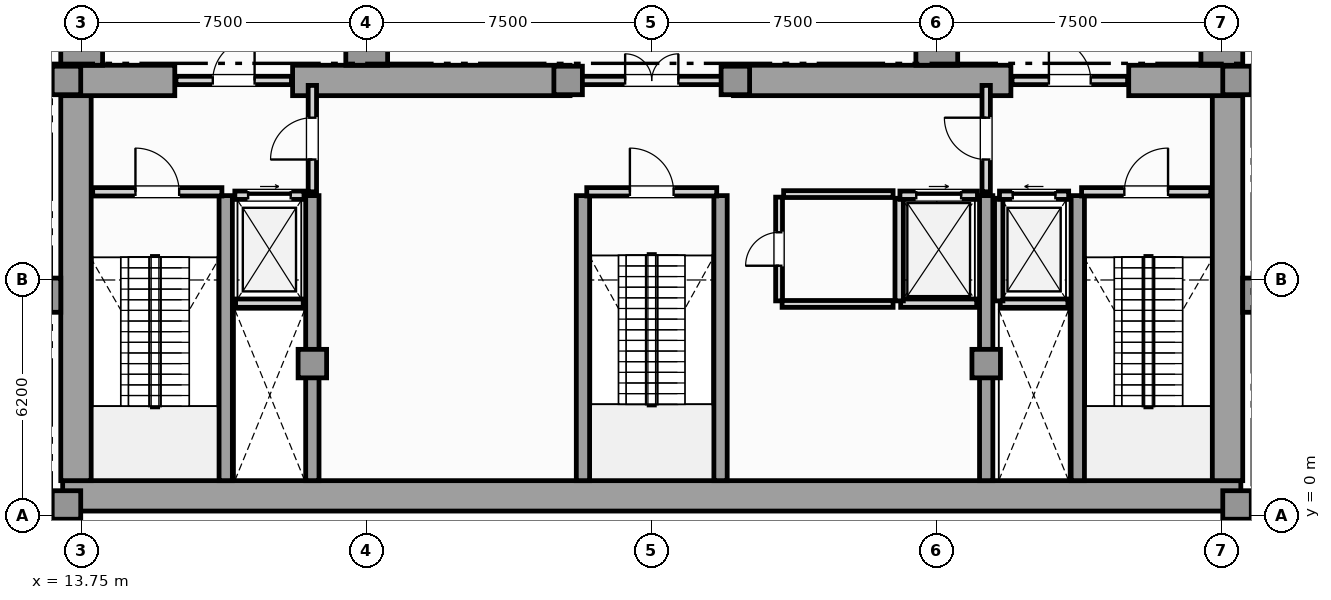
"""IFC4 building model, lengths in metres.
Left out: names, types, materials, properties, quantities, classifications, styles, units other than length and angle.
Written with IfcOpenShell. Run it as: python <this file> out.ifc"""

import sys

from ifc_helpers import new_model, si_unit, direction, frame, frame_2d, origin, origin_2d, place, context, subcontext, project, spatial, rectangle, extrude, element, fill, save


model = new_model("IFC4")
c1 = context("Model", 3, precision=1e-05, world=origin(), true_north=direction((0.0, 1.0)))
c2 = subcontext(c1, "Body", "Model", "MODEL_VIEW")
j1 = project(units=[si_unit("LENGTHUNIT", "METRE"), si_unit("PLANEANGLEUNIT", "RADIAN")], contexts=[c1])
p1 = place(None, origin())
s1 = spatial("IfcSite", under=j1, at=p1, CompositionType="ELEMENT")
p2 = place(p1, origin())
s2 = spatial("IfcBuilding", under=s1, at=p2, CompositionType="ELEMENT")
p3 = place(p2, frame((0.0, 0.0, -5.4)))
s3 = spatial("IfcBuildingStorey", under=s2, at=p3, CompositionType="ELEMENT", Elevation=-5.4)
p4 = place(p3, frame((13.25, 0.52, 0.0), z_axis=(0.0, 0.0, 1.0), x_axis=(1.0, 0.0, 0.0)))
e1 = element("IfcWall", 1, at=p4, inside=s3, PredefinedType="SHEAR", context=c2, shape_type="SweptSolid", body=[
    extrude(rectangle(XDim=31.0, YDim=0.8, at=frame_2d((15.5, 0.0))), origin(), (0.0, 0.0, 1.0), 5.05),
])
for number, where, z_axis, x_axis in (
    (2, (13.6, 0.92, 0.0), (0.0, 0.0, 1.0), (0.0, 1.0, 0.0)),
    (3, (43.9, 0.92, 0.0), (0.0, 0.0, 1.0), (0.0, 1.0, 0.0)),
):
    element("IfcWall", number, at=place(p3, frame(where, z_axis=z_axis, x_axis=x_axis)), inside=s3, PredefinedType="SHEAR", context=c2, shape_type="SweptSolid", body=[
        extrude(rectangle(XDim=10.53, YDim=0.8, at=frame_2d((5.265, 0.0))), origin(), (0.0, 0.0, 1.0), 5.05),
    ])
p5 = place(p3, frame((13.25, 11.45, 0.0), z_axis=(0.0, 0.0, 1.0), x_axis=(1.0, 0.0, 0.0)))
e4 = element("IfcWall", 4, at=p5, inside=s3, PredefinedType="SHEAR", context=c2, shape_type="SweptSolid", body=[
    extrude(rectangle(XDim=2.95, YDim=0.8, at=frame_2d((1.475, 0.0))), origin(), (0.0, 0.0, 1.0), 5.05),
])
for number, where, z_axis, x_axis in (
    (5, (19.3, 11.45, 0.0), (0.0, 0.0, 1.0), (1.0, 0.0, 0.0)),
    (6, (30.9, 11.45, 0.0), (0.0, 0.0, 1.0), (1.0, 0.0, 0.0)),
):
    element("IfcWall", number, at=place(p3, frame(where, z_axis=z_axis, x_axis=x_axis)), inside=s3, PredefinedType="SHEAR", context=c2, shape_type="SweptSolid", body=[
        extrude(rectangle(XDim=7.3, YDim=0.8, at=frame_2d((3.65, 0.0))), origin(), (0.0, 0.0, 1.0), 5.05),
    ])
p6 = place(p3, frame((41.3, 11.45, 0.0), z_axis=(0.0, 0.0, 1.0), x_axis=(1.0, 0.0, 0.0)))
e7 = element("IfcWall", 7, at=p6, inside=s3, PredefinedType="SHEAR", context=c2, shape_type="SweptSolid", body=[
    extrude(rectangle(XDim=2.95, YDim=0.8, at=frame_2d((1.475, 0.0))), origin(), (0.0, 0.0, 1.0), 5.05),
])
for number, where, z_axis, x_axis in (
    (8, (17.54, 0.92, 0.0), (0.0, 0.0, 1.0), (0.0, 1.0, 0.0)),
    (9, (19.82, 0.92, 0.0), (0.0, 0.0, 1.0), (0.0, 1.0, 0.0)),
    (10, (26.94, 0.92, 0.0), (0.0, 0.0, 1.0), (0.0, 1.0, 0.0)),
    (11, (30.56, 0.92, 0.0), (0.0, 0.0, 1.0), (0.0, 1.0, 0.0)),
    (12, (37.55, 0.92, 0.0), (0.0, 0.0, 1.0), (0.0, 1.0, 0.0)),
    (13, (39.96, 0.92, 0.0), (0.0, 0.0, 1.0), (0.0, 1.0, 0.0)),
):
    element("IfcWall", number, at=place(p3, frame(where, z_axis=z_axis, x_axis=x_axis)), inside=s3, PredefinedType="SHEAR", context=c2, shape_type="SweptSolid", body=[
        extrude(rectangle(XDim=7.5, YDim=0.35, at=frame_2d((3.75, 0.0))), origin(), (0.0, 0.0, 1.0), 5.05),
    ])
for number, where, z_axis, x_axis in (
    (14, (12.9, 5.8, 0.0), (0.0, 0.0, 1.0), (1.0, 0.0, 0.0)),
    (15, (44.6, 5.8, 0.0), (0.0, 0.0, 1.0), (1.0, 0.0, 0.0)),
):
    element("IfcColumn", number, at=place(p3, frame(where, z_axis=z_axis, x_axis=x_axis)), inside=s3, PredefinedType="PILASTER", context=c2, shape_type="SweptSolid", body=[
        extrude(rectangle(XDim=0.6, YDim=0.9, at=origin_2d()), origin(), (0.0, 0.0, 1.0), 5.4),
    ])
for number, where, z_axis, x_axis in (
    (16, (13.35, 0.28, 0.0), (0.0, 0.0, 1.0), (1.0, 0.0, 0.0)),
    (17, (44.15, 0.28, 0.0), (0.0, 0.0, 1.0), (1.0, 0.0, 0.0)),
    (18, (13.35, 11.45, 0.0), (0.0, 0.0, 1.0), (1.0, 0.0, 0.0)),
    (19, (44.15, 11.45, 0.0), (0.0, 0.0, 1.0), (1.0, 0.0, 0.0)),
    (20, (19.82, 4.0, 0.0), (0.0, 0.0, 1.0), (1.0, 0.0, 0.0)),
    (21, (37.55, 4.0, 0.0), (0.0, 0.0, 1.0), (1.0, 0.0, 0.0)),
    (22, (26.55, 11.45, 0.0), (0.0, 0.0, 1.0), (1.0, 0.0, 0.0)),
    (23, (30.95, 11.45, 0.0), (0.0, 0.0, 1.0), (1.0, 0.0, 0.0)),
):
    element("IfcColumn", number, at=place(p3, frame(where, z_axis=z_axis, x_axis=x_axis)), inside=s3, PredefinedType="COLUMN", context=c2, shape_type="SweptSolid", body=[
        extrude(rectangle(XDim=0.75, YDim=0.75, at=origin_2d()), origin(), (0.0, 0.0, 1.0), 5.4),
    ])
for number, where, z_axis, x_axis in (
    (24, (13.75, 12.4, 0.0), (0.0, 0.0, 1.0), (1.0, 0.0, 0.0)),
    (25, (43.75, 12.4, 0.0), (0.0, 0.0, 1.0), (1.0, 0.0, 0.0)),
    (26, (21.25, 12.4, 0.0), (0.0, 0.0, 1.0), (1.0, 0.0, 0.0)),
    (27, (36.25, 12.4, 0.0), (0.0, 0.0, 1.0), (1.0, 0.0, 0.0)),
):
    element("IfcColumn", number, at=place(p3, frame(where, z_axis=z_axis, x_axis=x_axis)), inside=s3, PredefinedType="COLUMN", context=c2, shape_type="SweptSolid", body=[
        extrude(rectangle(XDim=1.1, YDim=1.1, at=origin_2d()), origin(), (0.0, 0.0, 1.0), 5.4),
    ])
p7 = place(p3, frame((17.8, 5.59, 0.0), z_axis=(0.0, 0.0, 1.0), x_axis=(1.0, 0.0, 0.0)))
e28 = element("IfcWall", 28, at=p7, inside=s3, PredefinedType="SOLIDWALL", context=c2, shape_type="SweptSolid", body=[
    extrude(rectangle(XDim=1.78, YDim=0.22, at=frame_2d((0.89, 0.0))), origin(), (0.0, 0.0, 1.0), 5.05),
])
p8 = place(p3, frame((17.78, 8.43, 0.0), z_axis=(0.0, 0.0, 1.0), x_axis=(1.0, 0.0, 0.0)))
e29 = element("IfcWall", 29, at=p8, inside=s3, PredefinedType="SOLIDWALL", context=c2, shape_type="SweptSolid", body=[
    extrude(rectangle(XDim=1.82, YDim=0.22, at=frame_2d((0.91, 0.0))), origin(), (0.0, 0.0, 1.0), 5.05),
])
p9 = place(p8, frame((0.35, 0.0, 0.0)))
e30 = element("IfcOpeningElement", 30, at=p9, cuts=e29, PredefinedType="OPENING", context=c2, shape_type="SweptSolid", body=[
    extrude(rectangle(XDim=1.12, YDim=2.25, at=frame_2d((0.56, 1.125))), frame((0.0, 0.12, 0.0), z_axis=(0.0, -1.0, 0.0), x_axis=(1.0, 0.0, 0.0)), (0.0, 0.0, 1.0), 0.24),
])
p10 = place(p3, frame((37.92, 5.59, 0.0), z_axis=(0.0, 0.0, 1.0), x_axis=(1.0, 0.0, 0.0)))
e31 = element("IfcWall", 31, at=p10, inside=s3, PredefinedType="SOLIDWALL", context=c2, shape_type="SweptSolid", body=[
    extrude(rectangle(XDim=1.78, YDim=0.22, at=frame_2d((0.89, 0.0))), origin(), (0.0, 0.0, 1.0), 5.05),
])
p11 = place(p3, frame((37.88, 5.65, 0.0), z_axis=(0.0, 0.0, 1.0), x_axis=(0.0, 1.0, 0.0)))
e32 = element("IfcWall", 32, at=p11, inside=s3, PredefinedType="SOLIDWALL", context=c2, shape_type="SweptSolid", body=[
    extrude(rectangle(XDim=2.7, YDim=0.22, at=frame_2d((1.35, 0.0))), origin(), (0.0, 0.0, 1.0), 5.05),
])
p12 = place(p3, frame((37.9, 8.43, 0.0), z_axis=(0.0, 0.0, 1.0), x_axis=(1.0, 0.0, 0.0)))
e33 = element("IfcWall", 33, at=p12, inside=s3, PredefinedType="SOLIDWALL", context=c2, shape_type="SweptSolid", body=[
    extrude(rectangle(XDim=1.82, YDim=0.22, at=frame_2d((0.91, 0.0))), origin(), (0.0, 0.0, 1.0), 5.05),
])
p13 = place(p12, frame((0.35, 0.0, 0.0)))
e34 = element("IfcOpeningElement", 34, at=p13, cuts=e33, PredefinedType="OPENING", context=c2, shape_type="SweptSolid", body=[
    extrude(rectangle(XDim=1.12, YDim=2.25, at=frame_2d((0.56, 1.125))), frame((0.0, 0.12, 0.0), z_axis=(0.0, -1.0, 0.0), x_axis=(1.0, 0.0, 0.0)), (0.0, 0.0, 1.0), 0.24),
])
p14 = place(p3, frame((35.3, 5.59, 0.0), z_axis=(0.0, 0.0, 1.0), x_axis=(1.0, 0.0, 0.0)))
e35 = element("IfcWall", 35, at=p14, inside=s3, PredefinedType="SOLIDWALL", context=c2, shape_type="SweptSolid", body=[
    extrude(rectangle(XDim=2.0, YDim=0.22, at=frame_2d((1.0, 0.0))), origin(), (0.0, 0.0, 1.0), 5.05),
])
p15 = place(p3, frame((35.26, 5.65, 0.0), z_axis=(0.0, 0.0, 1.0), x_axis=(0.0, 1.0, 0.0)))
e36 = element("IfcWall", 36, at=p15, inside=s3, PredefinedType="SOLIDWALL", context=c2, shape_type="SweptSolid", body=[
    extrude(rectangle(XDim=2.7, YDim=0.22, at=frame_2d((1.35, 0.0))), origin(), (0.0, 0.0, 1.0), 5.05),
])
p16 = place(p3, frame((35.28, 8.43, 0.0), z_axis=(0.0, 0.0, 1.0), x_axis=(1.0, 0.0, 0.0)))
e37 = element("IfcWall", 37, at=p16, inside=s3, PredefinedType="SOLIDWALL", context=c2, shape_type="SweptSolid", body=[
    extrude(rectangle(XDim=2.04, YDim=0.22, at=frame_2d((1.02, 0.0))), origin(), (0.0, 0.0, 1.0), 5.05),
])
p17 = place(p16, frame((0.43, 0.0, 0.0)))
e38 = element("IfcOpeningElement", 38, at=p17, cuts=e37, PredefinedType="OPENING", context=c2, shape_type="SweptSolid", body=[
    extrude(rectangle(XDim=1.18, YDim=2.2, at=frame_2d((0.59, 1.1))), frame((0.0, 0.12, 0.0), z_axis=(0.0, -1.0, 0.0), x_axis=(1.0, 0.0, 0.0)), (0.0, 0.0, 1.0), 0.24),
])
p18 = place(p3, frame((14.04, 8.52, 0.0), z_axis=(0.0, 0.0, 1.0), x_axis=(1.0, 0.0, 0.0)))
e39 = element("IfcWall", 39, at=p18, inside=s3, PredefinedType="SOLIDWALL", context=c2, shape_type="SweptSolid", body=[
    extrude(rectangle(XDim=3.4, YDim=0.22, at=frame_2d((1.7, 0.0))), origin(), (0.0, 0.0, 1.0), 5.05),
])
p19 = place(p18, frame((1.125, 0.0, 0.0)))
e40 = element("IfcOpeningElement", 40, at=p19, cuts=e39, PredefinedType="OPENING", context=c2, shape_type="SweptSolid", body=[
    extrude(rectangle(XDim=1.15, YDim=2.2, at=frame_2d((0.575, 1.1))), frame((0.0, 0.12, 0.0), z_axis=(0.0, -1.0, 0.0), x_axis=(1.0, 0.0, 0.0)), (0.0, 0.0, 1.0), 0.24),
])
p20 = place(p3, frame((40.06, 8.52, 0.0), z_axis=(0.0, 0.0, 1.0), x_axis=(1.0, 0.0, 0.0)))
e41 = element("IfcWall", 41, at=p20, inside=s3, PredefinedType="SOLIDWALL", context=c2, shape_type="SweptSolid", body=[
    extrude(rectangle(XDim=3.4, YDim=0.22, at=frame_2d((1.7, 0.0))), origin(), (0.0, 0.0, 1.0), 5.05),
])
p21 = place(p20, frame((1.125, 0.0, 0.0)))
e42 = element("IfcOpeningElement", 42, at=p21, cuts=e41, PredefinedType="OPENING", context=c2, shape_type="SweptSolid", body=[
    extrude(rectangle(XDim=1.15, YDim=2.2, at=frame_2d((0.575, 1.1))), frame((0.0, 0.12, 0.0), z_axis=(0.0, -1.0, 0.0), x_axis=(1.0, 0.0, 0.0)), (0.0, 0.0, 1.0), 0.24),
])
p22 = place(p3, frame((27.04, 8.52, 0.0), z_axis=(0.0, 0.0, 1.0), x_axis=(1.0, 0.0, 0.0)))
e43 = element("IfcWall", 43, at=p22, inside=s3, PredefinedType="SOLIDWALL", context=c2, shape_type="SweptSolid", body=[
    extrude(rectangle(XDim=3.42, YDim=0.22, at=frame_2d((1.71, 0.0))), origin(), (0.0, 0.0, 1.0), 5.05),
])
p23 = place(p22, frame((1.135, 0.0, 0.0)))
e44 = element("IfcOpeningElement", 44, at=p23, cuts=e43, PredefinedType="OPENING", context=c2, shape_type="SweptSolid", body=[
    extrude(rectangle(XDim=1.15, YDim=2.2, at=frame_2d((0.575, 1.1))), frame((0.0, 0.12, 0.0), z_axis=(0.0, -1.0, 0.0), x_axis=(1.0, 0.0, 0.0)), (0.0, 0.0, 1.0), 0.24),
])
p24 = place(p3, frame((19.82, 8.52, 0.0), z_axis=(0.0, 0.0, 1.0), x_axis=(0.0, 1.0, 0.0)))
e45 = element("IfcWall", 45, at=p24, inside=s3, PredefinedType="SOLIDWALL", context=c2, shape_type="SweptSolid", body=[
    extrude(rectangle(XDim=2.8, YDim=0.22, at=frame_2d((1.4, 0.0))), origin(), (0.0, 0.0, 1.0), 4.505),
])
p25 = place(p24, frame((0.85, 0.0, 0.0)))
e46 = element("IfcOpeningElement", 46, at=p25, cuts=e45, PredefinedType="OPENING", context=c2, shape_type="SweptSolid", body=[
    extrude(rectangle(XDim=1.1, YDim=2.2, at=frame_2d((0.55, 1.1))), frame((0.0, 0.12, 0.0), z_axis=(0.0, -1.0, 0.0), x_axis=(1.0, 0.0, 0.0)), (0.0, 0.0, 1.0), 0.24),
])
p26 = place(p3, frame((37.55, 8.52, 0.0), z_axis=(0.0, 0.0, 1.0), x_axis=(0.0, 1.0, 0.0)))
e47 = element("IfcWall", 47, at=p26, inside=s3, PredefinedType="SOLIDWALL", context=c2, shape_type="SweptSolid", body=[
    extrude(rectangle(XDim=2.8, YDim=0.22, at=frame_2d((1.4, 0.0))), origin(), (0.0, 0.0, 1.0), 4.505),
])
p27 = place(p26, frame((0.85, 0.0, 0.0)))
e48 = element("IfcOpeningElement", 48, at=p27, cuts=e47, PredefinedType="OPENING", context=c2, shape_type="SweptSolid", body=[
    extrude(rectangle(XDim=1.1, YDim=2.2, at=frame_2d((0.55, 1.1))), frame((0.0, 0.12, 0.0), z_axis=(0.0, -1.0, 0.0), x_axis=(1.0, 0.0, 0.0)), (0.0, 0.0, 1.0), 0.24),
])
p28 = place(p3, frame((16.23, 11.45, 0.0), z_axis=(0.0, 0.0, 1.0), x_axis=(1.0, 0.0, 0.0)))
e49 = element("IfcWall", 49, at=p28, inside=s3, PredefinedType="SOLIDWALL", context=c2, shape_type="SweptSolid", body=[
    extrude(rectangle(XDim=3.04, YDim=0.22, at=frame_2d((1.52, 0.0))), origin(), (0.0, 0.0, 1.0), 5.05),
])
p29 = place(p28, frame((0.97, 0.0, 0.0)))
e50 = element("IfcOpeningElement", 50, at=p29, cuts=e49, PredefinedType="OPENING", context=c2, shape_type="SweptSolid", body=[
    extrude(rectangle(XDim=1.1, YDim=2.2, at=frame_2d((0.55, 1.1))), frame((0.0, 0.12, 0.0), z_axis=(0.0, -1.0, 0.0), x_axis=(1.0, 0.0, 0.0)), (0.0, 0.0, 1.0), 0.24),
])
p30 = place(p3, frame((26.63, 11.45, 0.0), z_axis=(0.0, 0.0, 1.0), x_axis=(1.0, 0.0, 0.0)))
e51 = element("IfcWall", 51, at=p30, inside=s3, PredefinedType="SOLIDWALL", context=c2, shape_type="SweptSolid", body=[
    extrude(rectangle(XDim=4.24, YDim=0.22, at=frame_2d((2.12, 0.0))), origin(), (0.0, 0.0, 1.0), 5.05),
])
p31 = place(p30, frame((1.42, 0.0, 0.0)))
e52 = element("IfcOpeningElement", 52, at=p31, cuts=e51, PredefinedType="OPENING", context=c2, shape_type="SweptSolid", body=[
    extrude(rectangle(XDim=1.4, YDim=2.2, at=frame_2d((0.7, 1.1))), frame((0.0, 0.12, 0.0), z_axis=(0.0, -1.0, 0.0), x_axis=(1.0, 0.0, 0.0)), (0.0, 0.0, 1.0), 0.24),
])
p32 = place(p3, frame((38.23, 11.45, 0.0), z_axis=(0.0, 0.0, 1.0), x_axis=(1.0, 0.0, 0.0)))
e53 = element("IfcWall", 53, at=p32, inside=s3, PredefinedType="SOLIDWALL", context=c2, shape_type="SweptSolid", body=[
    extrude(rectangle(XDim=3.04, YDim=0.22, at=frame_2d((1.52, 0.0))), origin(), (0.0, 0.0, 1.0), 5.05),
])
p33 = place(p32, frame((0.97, 0.0, 0.0)))
e54 = element("IfcOpeningElement", 54, at=p33, cuts=e53, PredefinedType="OPENING", context=c2, shape_type="SweptSolid", body=[
    extrude(rectangle(XDim=1.1, YDim=2.2, at=frame_2d((0.55, 1.1))), frame((0.0, 0.12, 0.0), z_axis=(0.0, -1.0, 0.0), x_axis=(1.0, 0.0, 0.0)), (0.0, 0.0, 1.0), 0.24),
])
p34 = place(p3, frame((32.1, 5.65, 0.0), z_axis=(0.0, 0.0, 1.0), x_axis=(0.0, 1.0, 0.0)))
e55 = element("IfcWall", 55, at=p34, inside=s3, PredefinedType="PARTITIONING", context=c2, shape_type="SweptSolid", body=[
    extrude(rectangle(XDim=2.73, YDim=0.18, at=frame_2d((1.365, 0.0))), origin(), (0.0, 0.0, 1.0), 5.05),
])
p35 = place(p34, frame((0.925, 0.0, 0.0)))
e56 = element("IfcOpeningElement", 56, at=p35, cuts=e55, PredefinedType="OPENING", context=c2, shape_type="SweptSolid", body=[
    extrude(rectangle(XDim=0.88, YDim=2.05, at=frame_2d((0.44, 1.025))), frame((0.0, 0.1, 0.0), z_axis=(0.0, -1.0, 0.0), x_axis=(1.0, 0.0, 0.0)), (0.0, 0.0, 1.0), 0.2),
])
p36 = place(p3, frame((32.22, 8.46, 0.0), z_axis=(0.0, 0.0, 1.0), x_axis=(1.0, 0.0, 0.0)))
e57 = element("IfcWall", 57, at=p36, inside=s3, PredefinedType="PARTITIONING", context=c2, shape_type="SweptSolid", body=[
    extrude(rectangle(XDim=2.88, YDim=0.18, at=frame_2d((1.44, 0.0))), origin(), (0.0, 0.0, 1.0), 5.05),
])
p37 = place(p3, frame((32.18, 5.57, 0.0), z_axis=(0.0, 0.0, 1.0), x_axis=(1.0, 0.0, 0.0)))
e58 = element("IfcWall", 58, at=p37, inside=s3, PredefinedType="PARTITIONING", context=c2, shape_type="SweptSolid", body=[
    extrude(rectangle(XDim=2.92, YDim=0.18, at=frame_2d((1.46, 0.0))), origin(), (0.0, 0.0, 1.0), 5.05),
])
p38 = place(p9, origin())
e59 = element("IfcDoor", 59, at=p38, inside=s3, OperationType="SLIDING_TO_RIGHT", PredefinedType="DOOR", context=c2, shape_type="SweptSolid", body=[
    extrude(rectangle(XDim=1.12, YDim=2.25, at=frame_2d((0.56, 1.125))), frame((0.0, 0.025, 0.0), z_axis=(0.0, -1.0, 0.0), x_axis=(1.0, 0.0, 0.0)), (0.0, 0.0, 1.0), 0.05),
])
fill(e30, e59)
p39 = place(p13, origin())
e60 = element("IfcDoor", 60, at=p39, inside=s3, OperationType="SLIDING_TO_LEFT", PredefinedType="DOOR", context=c2, shape_type="SweptSolid", body=[
    extrude(rectangle(XDim=1.12, YDim=2.25, at=frame_2d((0.56, 1.125))), frame((0.0, 0.025, 0.0), z_axis=(0.0, -1.0, 0.0), x_axis=(1.0, 0.0, 0.0)), (0.0, 0.0, 1.0), 0.05),
])
fill(e34, e60)
p40 = place(p17, origin())
e61 = element("IfcDoor", 61, at=p40, inside=s3, OperationType="SLIDING_TO_RIGHT", PredefinedType="DOOR", context=c2, shape_type="SweptSolid", body=[
    extrude(rectangle(XDim=1.18, YDim=2.2, at=frame_2d((0.59, 1.1))), frame((0.0, 0.025, 0.0), z_axis=(0.0, -1.0, 0.0), x_axis=(1.0, 0.0, 0.0)), (0.0, 0.0, 1.0), 0.05),
])
fill(e38, e61)
p41 = place(p19, origin())
e62 = element("IfcDoor", 62, at=p41, inside=s3, OperationType="SINGLE_SWING_LEFT", PredefinedType="DOOR", context=c2, shape_type="SweptSolid", body=[
    extrude(rectangle(XDim=1.15, YDim=2.2, at=frame_2d((0.575, 1.1))), frame((0.0, 0.025, 0.0), z_axis=(0.0, -1.0, 0.0), x_axis=(1.0, 0.0, 0.0)), (0.0, 0.0, 1.0), 0.05),
])
fill(e40, e62)
p42 = place(p21, origin())
e63 = element("IfcDoor", 63, at=p42, inside=s3, OperationType="SINGLE_SWING_RIGHT", PredefinedType="DOOR", context=c2, shape_type="SweptSolid", body=[
    extrude(rectangle(XDim=1.15, YDim=2.2, at=frame_2d((0.575, 1.1))), frame((0.0, 0.025, 0.0), z_axis=(0.0, -1.0, 0.0), x_axis=(1.0, 0.0, 0.0)), (0.0, 0.0, 1.0), 0.05),
])
fill(e42, e63)
p43 = place(p23, origin())
e64 = element("IfcDoor", 64, at=p43, inside=s3, OperationType="SINGLE_SWING_LEFT", PredefinedType="DOOR", context=c2, shape_type="SweptSolid", body=[
    extrude(rectangle(XDim=1.15, YDim=2.2, at=frame_2d((0.575, 1.1))), frame((0.0, 0.025, 0.0), z_axis=(0.0, -1.0, 0.0), x_axis=(1.0, 0.0, 0.0)), (0.0, 0.0, 1.0), 0.05),
])
fill(e44, e64)
p44 = place(p25, origin())
e65 = element("IfcDoor", 65, at=p44, inside=s3, OperationType="SINGLE_SWING_LEFT", PredefinedType="DOOR", context=c2, shape_type="SweptSolid", body=[
    extrude(rectangle(XDim=1.1, YDim=2.2, at=frame_2d((0.55, 1.1))), frame((0.0, 0.025, 0.0), z_axis=(0.0, -1.0, 0.0), x_axis=(1.0, 0.0, 0.0)), (0.0, 0.0, 1.0), 0.05),
])
fill(e46, e65)
p45 = place(p27, origin())
e66 = element("IfcDoor", 66, at=p45, inside=s3, OperationType="SINGLE_SWING_RIGHT", PredefinedType="DOOR", context=c2, shape_type="SweptSolid", body=[
    extrude(rectangle(XDim=1.1, YDim=2.2, at=frame_2d((0.55, 1.1))), frame((0.0, 0.025, 0.0), z_axis=(0.0, -1.0, 0.0), x_axis=(1.0, 0.0, 0.0)), (0.0, 0.0, 1.0), 0.05),
])
fill(e48, e66)
p46 = place(p29, origin())
e67 = element("IfcDoor", 67, at=p46, inside=s3, OperationType="SINGLE_SWING_RIGHT", PredefinedType="DOOR", context=c2, shape_type="SweptSolid", body=[
    extrude(rectangle(XDim=1.1, YDim=2.2, at=frame_2d((0.55, 1.1))), frame((0.0, 0.025, 0.0), z_axis=(0.0, -1.0, 0.0), x_axis=(1.0, 0.0, 0.0)), (0.0, 0.0, 1.0), 0.05),
])
fill(e50, e67)
p47 = place(p31, origin())
e68 = element("IfcDoor", 68, at=p47, inside=s3, OperationType="DOUBLE_DOOR_SINGLE_SWING", PredefinedType="DOOR", context=c2, shape_type="SweptSolid", body=[
    extrude(rectangle(XDim=1.4, YDim=2.2, at=frame_2d((0.7, 1.1))), frame((0.0, 0.025, 0.0), z_axis=(0.0, -1.0, 0.0), x_axis=(1.0, 0.0, 0.0)), (0.0, 0.0, 1.0), 0.05),
])
fill(e52, e68)
p48 = place(p33, origin())
e69 = element("IfcDoor", 69, at=p48, inside=s3, OperationType="SINGLE_SWING_LEFT", PredefinedType="DOOR", context=c2, shape_type="SweptSolid", body=[
    extrude(rectangle(XDim=1.1, YDim=2.2, at=frame_2d((0.55, 1.1))), frame((0.0, 0.025, 0.0), z_axis=(0.0, -1.0, 0.0), x_axis=(1.0, 0.0, 0.0)), (0.0, 0.0, 1.0), 0.05),
])
fill(e54, e69)
p49 = place(p35, origin())
e70 = element("IfcDoor", 70, at=p49, inside=s3, OperationType="SINGLE_SWING_LEFT", PredefinedType="DOOR", context=c2, shape_type="SweptSolid", body=[
    extrude(rectangle(XDim=0.88, YDim=2.05, at=frame_2d((0.44, 1.025))), frame((0.0, 0.025, 0.0), z_axis=(0.0, -1.0, 0.0), x_axis=(1.0, 0.0, 0.0)), (0.0, 0.0, 1.0), 0.05),
])
fill(e56, e70)
save(model, sys.argv[1])
